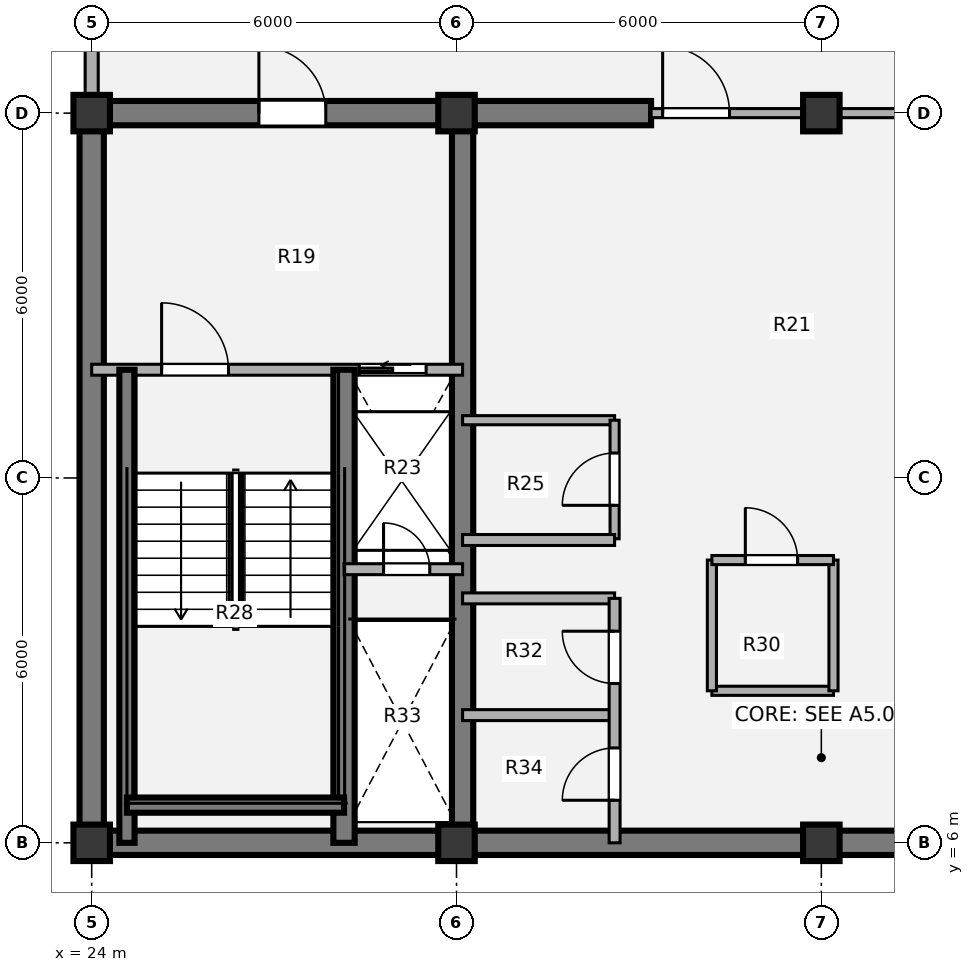
"""IFC4 building model, lengths in metres.
Left out: names, types, materials, properties, quantities, classifications, styles, units other than length and angle.
Written with IfcOpenShell. Run it as: python <this file> out.ifc"""

import sys

from ifc_helpers import new_model, si_unit, direction, frame, frame_2d, origin, origin_2d, place, context, subcontext, project, spatial, rectangle, extrude, source, transform, mapped, element, fill, save


model = new_model("IFC4")
c1 = context("Model", 3, precision=1e-05, world=origin(), true_north=direction((0.0, 1.0)))
c2 = subcontext(c1, "Body", "Model", "MODEL_VIEW")
j1 = project(units=[si_unit("LENGTHUNIT", "METRE"), si_unit("PLANEANGLEUNIT", "RADIAN")], contexts=[c1])
p1 = place(None, origin())
s1 = spatial("IfcSite", under=j1, at=p1, CompositionType="ELEMENT")
p2 = place(p1, origin())
s2 = spatial("IfcBuilding", under=s1, at=p2, CompositionType="ELEMENT")
p3 = place(p2, frame((0.0, 0.0, 241.92)))
s3 = spatial("IfcBuildingStorey", under=s2, at=p3, CompositionType="ELEMENT", Elevation=241.92)
m1 = source(origin(), c2, "Body", "SweptSolid", [
    extrude(rectangle(XDim=0.6, YDim=0.6, at=origin_2d()), origin(), (0.0, 0.0, 1.0), 3.78),
])
for number, where, z_axis, x_axis in (
    (1, (24.0, 6.0, 0.0), (0.0, 0.0, 1.0), (1.0, 0.0, 0.0)),
    (2, (30.0, 6.0, 0.0), (0.0, 0.0, 1.0), (1.0, 0.0, 0.0)),
    (3, (36.0, 6.0, 0.0), (0.0, 0.0, 1.0), (1.0, 0.0, 0.0)),
    (4, (24.0, 18.0, 0.0), (0.0, 0.0, 1.0), (1.0, 0.0, 0.0)),
    (5, (30.0, 18.0, 0.0), (0.0, 0.0, 1.0), (1.0, 0.0, 0.0)),
    (6, (36.0, 18.0, 0.0), (0.0, 0.0, 1.0), (1.0, 0.0, 0.0)),
):
    element("IfcColumn", number, at=place(p3, frame(where, z_axis=z_axis, x_axis=x_axis)), inside=s3, PredefinedType="COLUMN", context=c2, shape_type="MappedRepresentation", body=[
        mapped(m1, transform((0.0, 0.0, 0.0), x_axis=(1.0, 0.0, 0.0), y_axis=(0.0, 1.0, 0.0), z_axis=(0.0, 0.0, 1.0), scale=1.0)),
    ])
p4 = place(p3, frame((48.2, 6.0, 0.0), z_axis=(0.0, 0.0, 1.0), x_axis=(-1.0, 0.0, 0.0)))
e7 = element("IfcWall", 7, at=p4, inside=s3, PredefinedType="SHEAR", context=c2, shape_type="SweptSolid", body=[
    extrude(rectangle(XDim=24.4, YDim=0.4, at=frame_2d((12.2, 0.0))), origin(), (0.0, 0.0, 1.0), 3.78),
])
p5 = place(p3, frame((24.0, 6.0, 0.0), z_axis=(0.0, 0.0, 1.0), x_axis=(0.0, 1.0, 0.0)))
e8 = element("IfcWall", 8, at=p5, inside=s3, PredefinedType="SHEAR", context=c2, shape_type="SweptSolid", body=[
    extrude(rectangle(XDim=12.0, YDim=0.4, at=frame_2d((6.0, 0.0))), origin(), (0.0, 0.0, 1.0), 3.78),
])
p6 = place(p3, frame((23.8, 18.0, 0.0), z_axis=(0.0, 0.0, 1.0), x_axis=(1.0, 0.0, 0.0)))
e9 = element("IfcWall", 9, at=p6, inside=s3, PredefinedType="SHEAR", context=c2, shape_type="SweptSolid", body=[
    extrude(rectangle(XDim=9.4, YDim=0.4, at=frame_2d((4.7, 0.0))), origin(), (0.0, 0.0, 1.0), 3.78),
])
p7 = place(p6, frame((2.95, 0.0, 0.0)))
e10 = element("IfcOpeningElement", 10, at=p7, cuts=e9, PredefinedType="OPENING", context=c2, shape_type="SweptSolid", body=[
    extrude(rectangle(XDim=1.1, YDim=2.1, at=origin_2d()), frame((0.55, 0.21, 1.05), z_axis=(0.0, -1.0, 0.0), x_axis=(1.0, 0.0, 0.0)), (0.0, 0.0, 1.0), 0.42),
])
p8 = place(p3, frame((30.1, 6.0, 0.0), z_axis=(0.0, 0.0, 1.0), x_axis=(0.0, 1.0, 0.0)))
e11 = element("IfcWall", 11, at=p8, inside=s3, PredefinedType="SHEAR", context=c2, shape_type="SweptSolid", body=[
    extrude(rectangle(XDim=12.0, YDim=0.35, at=frame_2d((6.0, 0.0))), origin(), (0.0, 0.0, 1.0), 3.78),
])
p9 = place(p3, frame((24.0, 18.28, 0.0), z_axis=(0.0, 0.0, 1.0), x_axis=(0.0, 1.0, 0.0)))
e12 = element("IfcWall", 12, at=p9, inside=s3, PredefinedType="SOLIDWALL", context=c2, shape_type="SweptSolid", body=[
    extrude(rectangle(XDim=2.77, YDim=0.215, at=frame_2d((1.385, 0.0))), origin(), (0.0, 0.0, 1.0), 2.718),
])
p10 = place(p3, frame((30.1, 12.95, 0.0), z_axis=(0.0, 0.0, 1.0), x_axis=(1.0, 0.0, 0.0)))
e13 = element("IfcWall", 13, at=p10, inside=s3, PredefinedType="PARTITIONING", context=c2, shape_type="SweptSolid", body=[
    extrude(rectangle(XDim=2.5, YDim=0.15, at=frame_2d((1.25, 0.0))), origin(), (0.0, 0.0, 1.0), 3.5),
])
p11 = place(p3, frame((32.6, 11.0, 0.0), z_axis=(0.0, 0.0, 1.0), x_axis=(0.0, 1.0, 0.0)))
e14 = element("IfcWall", 14, at=p11, inside=s3, PredefinedType="PARTITIONING", context=c2, shape_type="SweptSolid", body=[
    extrude(rectangle(XDim=1.95, YDim=0.15, at=frame_2d((0.975, 0.0))), origin(), (0.0, 0.0, 1.0), 3.5),
])
p12 = place(p11, frame((0.55, 0.0, 0.0)))
e15 = element("IfcOpeningElement", 15, at=p12, cuts=e14, PredefinedType="OPENING", context=c2, shape_type="SweptSolid", body=[
    extrude(rectangle(XDim=0.86, YDim=2.1, at=origin_2d()), frame((0.43, 0.085, 1.05), z_axis=(0.0, -1.0, 0.0), x_axis=(1.0, 0.0, 0.0)), (0.0, 0.0, 1.0), 0.17),
])
p13 = place(p3, frame((34.2, 8.5, 0.0), z_axis=(0.0, 0.0, 1.0), x_axis=(1.0, 0.0, 0.0)))
e16 = element("IfcWall", 16, at=p13, inside=s3, PredefinedType="PARTITIONING", context=c2, shape_type="SweptSolid", body=[
    extrude(rectangle(XDim=2.0, YDim=0.15, at=frame_2d((1.0, 0.0))), origin(), (0.0, 0.0, 1.0), 3.5),
])
p14 = place(p3, frame((34.2, 8.5, 0.0), z_axis=(0.0, 0.0, 1.0), x_axis=(0.0, 1.0, 0.0)))
e17 = element("IfcWall", 17, at=p14, inside=s3, PredefinedType="PARTITIONING", context=c2, shape_type="SweptSolid", body=[
    extrude(rectangle(XDim=2.15, YDim=0.15, at=frame_2d((1.075, 0.0))), origin(), (0.0, 0.0, 1.0), 3.5),
])
p15 = place(p3, frame((36.2, 8.5, 0.0), z_axis=(0.0, 0.0, 1.0), x_axis=(0.0, 1.0, 0.0)))
e18 = element("IfcWall", 18, at=p15, inside=s3, PredefinedType="PARTITIONING", context=c2, shape_type="SweptSolid", body=[
    extrude(rectangle(XDim=2.15, YDim=0.15, at=frame_2d((1.075, 0.0))), origin(), (0.0, 0.0, 1.0), 2.715),
])
p16 = place(p3, frame((34.2, 10.65, 0.0), z_axis=(0.0, 0.0, 1.0), x_axis=(1.0, 0.0, 0.0)))
e19 = element("IfcWall", 19, at=p16, inside=s3, PredefinedType="PARTITIONING", context=c2, shape_type="SweptSolid", body=[
    extrude(rectangle(XDim=2.0, YDim=0.15, at=frame_2d((1.0, 0.0))), origin(), (0.0, 0.0, 1.0), 3.5),
])
p17 = place(p16, frame((0.55, 0.0, 0.0)))
e20 = element("IfcOpeningElement", 20, at=p17, cuts=e19, PredefinedType="OPENING", context=c2, shape_type="SweptSolid", body=[
    extrude(rectangle(XDim=0.86, YDim=2.1, at=origin_2d()), frame((0.43, 0.085, 1.05), z_axis=(0.0, -1.0, 0.0), x_axis=(1.0, 0.0, 0.0)), (0.0, 0.0, 1.0), 0.17),
])
for number, where, z_axis, x_axis in (
    (21, (30.1, 10.98, 0.0), (0.0, 0.0, 1.0), (1.0, 0.0, 0.0)),
    (22, (30.1, 8.1, 0.0), (0.0, 0.0, 1.0), (1.0, 0.0, 0.0)),
    (23, (30.1, 10.02, 0.0), (0.0, 0.0, 1.0), (1.0, 0.0, 0.0)),
):
    element("IfcWall", number, at=place(p3, frame(where, z_axis=z_axis, x_axis=x_axis)), inside=s3, PredefinedType="PARTITIONING", context=c2, shape_type="SweptSolid", body=[
        extrude(rectangle(XDim=2.5, YDim=0.18, at=frame_2d((1.25, 0.0))), origin(), (0.0, 0.0, 1.0), 3.5),
    ])
p18 = place(p3, frame((32.6, 6.0, 0.0), z_axis=(0.0, 0.0, 1.0), x_axis=(0.0, 1.0, 0.0)))
e24 = element("IfcWall", 24, at=p18, inside=s3, PredefinedType="PARTITIONING", context=c2, shape_type="SweptSolid", body=[
    extrude(rectangle(XDim=4.02, YDim=0.18, at=frame_2d((2.01, 0.0))), origin(), (0.0, 0.0, 1.0), 3.5),
])
p19 = place(p18, frame((0.7, 0.0, 0.0)))
e25 = element("IfcOpeningElement", 25, at=p19, cuts=e24, PredefinedType="OPENING", context=c2, shape_type="SweptSolid", body=[
    extrude(rectangle(XDim=0.86, YDim=2.1, at=origin_2d()), frame((0.43, 0.1, 1.05), z_axis=(0.0, -1.0, 0.0), x_axis=(1.0, 0.0, 0.0)), (0.0, 0.0, 1.0), 0.2),
])
p20 = place(p18, frame((2.62, 0.0, 0.0)))
e26 = element("IfcOpeningElement", 26, at=p20, cuts=e24, PredefinedType="OPENING", context=c2, shape_type="SweptSolid", body=[
    extrude(rectangle(XDim=0.86, YDim=2.1, at=origin_2d()), frame((0.43, 0.1, 1.05), z_axis=(0.0, -1.0, 0.0), x_axis=(1.0, 0.0, 0.0)), (0.0, 0.0, 1.0), 0.2),
])
p21 = place(p3, frame((33.2, 18.0, 0.0), z_axis=(0.0, 0.0, 1.0), x_axis=(1.0, 0.0, 0.0)))
e27 = element("IfcWall", 27, at=p21, inside=s3, PredefinedType="PARTITIONING", context=c2, shape_type="SweptSolid", body=[
    extrude(rectangle(XDim=5.6, YDim=0.15, at=frame_2d((2.8, 0.0))), origin(), (0.0, 0.0, 1.0), 2.515),
])
p22 = place(p21, frame((0.19, 0.0, 0.0)))
e28 = element("IfcOpeningElement", 28, at=p22, cuts=e27, PredefinedType="OPENING", context=c2, shape_type="SweptSolid", body=[
    extrude(rectangle(XDim=1.1, YDim=2.1, at=origin_2d()), frame((0.55, 0.085, 1.05), z_axis=(0.0, -1.0, 0.0), x_axis=(1.0, 0.0, 0.0)), (0.0, 0.0, 1.0), 0.17),
])
p23 = place(p21, frame((4.31, 0.0, 0.0)))
e29 = element("IfcOpeningElement", 29, at=p23, cuts=e27, PredefinedType="OPENING", context=c2, shape_type="SweptSolid", body=[
    extrude(rectangle(XDim=1.1, YDim=2.1, at=origin_2d()), frame((0.55, 0.085, 1.05), z_axis=(0.0, -1.0, 0.0), x_axis=(1.0, 0.0, 0.0)), (0.0, 0.0, 1.0), 0.17),
])
p24 = place(p3, frame((24.0, 13.78, 0.0), z_axis=(0.0, 0.0, 1.0), x_axis=(1.0, 0.0, 0.0)))
e30 = element("IfcWall", 30, at=p24, inside=s3, PredefinedType="PARTITIONING", context=c2, shape_type="SweptSolid", body=[
    extrude(rectangle(XDim=6.1, YDim=0.18, at=frame_2d((3.05, 0.0))), origin(), (0.0, 0.0, 1.0), 3.5),
])
p25 = place(p24, frame((1.15, 0.0, 0.0)))
e31 = element("IfcOpeningElement", 31, at=p25, cuts=e30, PredefinedType="OPENING", context=c2, shape_type="SweptSolid", body=[
    extrude(rectangle(XDim=1.1, YDim=2.1, at=origin_2d()), frame((0.55, 0.1, 1.05), z_axis=(0.0, -1.0, 0.0), x_axis=(1.0, 0.0, 0.0)), (0.0, 0.0, 1.0), 0.2),
])
p26 = place(p24, frame((4.4, 0.0, 0.0)))
e32 = element("IfcOpeningElement", 32, at=p26, cuts=e30, PredefinedType="OPENING", context=c2, shape_type="SweptSolid", body=[
    extrude(rectangle(XDim=1.1, YDim=2.1, at=origin_2d()), frame((0.55, 0.1, 1.05), z_axis=(0.0, -1.0, 0.0), x_axis=(1.0, 0.0, 0.0)), (0.0, 0.0, 1.0), 0.2),
])
p27 = place(p3, frame((28.15, 6.0, 0.0), z_axis=(0.0, 0.0, 1.0), x_axis=(0.0, 1.0, 0.0)))
e33 = element("IfcWall", 33, at=p27, inside=s3, PredefinedType="SHEAR", context=c2, shape_type="SweptSolid", body=[
    extrude(rectangle(XDim=7.78, YDim=0.35, at=frame_2d((3.89, 0.0))), origin(), (0.0, 0.0, 1.0), 3.85),
])
p28 = place(p3, frame((24.58, 6.0, 0.0), z_axis=(0.0, 0.0, 1.0), x_axis=(0.0, 1.0, 0.0)))
e34 = element("IfcWall", 34, at=p28, inside=s3, PredefinedType="SHEAR", context=c2, shape_type="SweptSolid", body=[
    extrude(rectangle(XDim=7.78, YDim=0.25, at=frame_2d((3.89, 0.0))), origin(), (0.0, 0.0, 1.0), 3.85),
])
p29 = place(p3, frame((24.58, 6.62, 0.0), z_axis=(0.0, 0.0, 1.0), x_axis=(1.0, 0.0, 0.0)))
e35 = element("IfcWall", 35, at=p29, inside=s3, PredefinedType="SHEAR", context=c2, shape_type="SweptSolid", body=[
    extrude(rectangle(XDim=3.57, YDim=0.25, at=frame_2d((1.785, 0.0))), origin(), (0.0, 0.0, 1.0), 3.85),
])
p30 = place(p3, frame((28.15, 10.5, 0.0), z_axis=(0.0, 0.0, 1.0), x_axis=(1.0, 0.0, 0.0)))
e36 = element("IfcWall", 36, at=p30, inside=s3, PredefinedType="PARTITIONING", context=c2, shape_type="SweptSolid", body=[
    extrude(rectangle(XDim=1.95, YDim=0.18, at=frame_2d((0.975, 0.0))), origin(), (0.0, 0.0, 1.0), 3.5),
])
p31 = place(p30, frame((0.65, 0.0, 0.0)))
e37 = element("IfcOpeningElement", 37, at=p31, cuts=e36, PredefinedType="OPENING", context=c2, shape_type="SweptSolid", body=[
    extrude(rectangle(XDim=0.76, YDim=2.05, at=origin_2d()), frame((0.38, 0.1, 1.025), z_axis=(0.0, -1.0, 0.0), x_axis=(1.0, 0.0, 0.0)), (0.0, 0.0, 1.0), 0.2),
])
m2 = source(origin(), c2, "Body", "SweptSolid", [
    extrude(rectangle(XDim=0.86, YDim=2.1, at=origin_2d()), frame((0.43, 0.025, 1.05), z_axis=(0.0, -1.0, 0.0), x_axis=(1.0, 0.0, 0.0)), (0.0, 0.0, 1.0), 0.05),
])
p32 = place(p12, origin())
e38 = element("IfcDoor", 38, at=p32, inside=s3, OperationType="SINGLE_SWING_LEFT", PredefinedType="DOOR", context=c2, shape_type="MappedRepresentation", body=[
    mapped(m2, transform((0.0, 0.0, 0.0), x_axis=(1.0, 0.0, 0.0), y_axis=(0.0, 1.0, 0.0), z_axis=(0.0, 0.0, 1.0), scale=1.0)),
])
fill(e15, e38)
p33 = place(p17, origin())
e39 = element("IfcDoor", 39, at=p33, inside=s3, OperationType="SINGLE_SWING_LEFT", PredefinedType="DOOR", context=c2, shape_type="MappedRepresentation", body=[
    mapped(m2, transform((0.0, 0.0, 0.0), x_axis=(1.0, 0.0, 0.0), y_axis=(0.0, 1.0, 0.0), z_axis=(0.0, 0.0, 1.0), scale=1.0)),
])
fill(e20, e39)
p34 = place(p19, origin())
e40 = element("IfcDoor", 40, at=p34, inside=s3, OperationType="SINGLE_SWING_LEFT", PredefinedType="DOOR", context=c2, shape_type="MappedRepresentation", body=[
    mapped(m2, transform((0.0, 0.0, 0.0), x_axis=(1.0, 0.0, 0.0), y_axis=(0.0, 1.0, 0.0), z_axis=(0.0, 0.0, 1.0), scale=1.0)),
])
fill(e25, e40)
p35 = place(p20, origin())
e41 = element("IfcDoor", 41, at=p35, inside=s3, OperationType="SINGLE_SWING_RIGHT", PredefinedType="DOOR", context=c2, shape_type="MappedRepresentation", body=[
    mapped(m2, transform((0.0, 0.0, 0.0), x_axis=(1.0, 0.0, 0.0), y_axis=(0.0, 1.0, 0.0), z_axis=(0.0, 0.0, 1.0), scale=1.0)),
])
fill(e26, e41)
m3 = source(origin(), c2, "Body", "SweptSolid", [
    extrude(rectangle(XDim=1.1, YDim=2.1, at=origin_2d()), frame((0.55, 0.025, 1.05), z_axis=(0.0, -1.0, 0.0), x_axis=(1.0, 0.0, 0.0)), (0.0, 0.0, 1.0), 0.05),
])
p36 = place(p22, origin())
e42 = element("IfcDoor", 42, at=p36, inside=s3, OperationType="SINGLE_SWING_LEFT", PredefinedType="DOOR", context=c2, shape_type="MappedRepresentation", body=[
    mapped(m3, transform((0.0, 0.0, 0.0), x_axis=(1.0, 0.0, 0.0), y_axis=(0.0, 1.0, 0.0), z_axis=(0.0, 0.0, 1.0), scale=1.0)),
])
fill(e28, e42)
m4 = source(origin(), c2, "Body", "SweptSolid", [
    extrude(rectangle(XDim=1.1, YDim=2.1, at=origin_2d()), frame((0.55, 0.025, 1.05), z_axis=(0.0, -1.0, 0.0), x_axis=(1.0, 0.0, 0.0)), (0.0, 0.0, 1.0), 0.05),
])
p37 = place(p25, origin())
e43 = element("IfcDoor", 43, at=p37, inside=s3, OperationType="SINGLE_SWING_LEFT", PredefinedType="DOOR", context=c2, shape_type="MappedRepresentation", body=[
    mapped(m4, transform((0.0, 0.0, 0.0), x_axis=(1.0, 0.0, 0.0), y_axis=(0.0, 1.0, 0.0), z_axis=(0.0, 0.0, 1.0), scale=1.0)),
])
fill(e31, e43)
m5 = source(origin(), c2, "Body", "SweptSolid", [
    extrude(rectangle(XDim=1.1, YDim=2.1, at=origin_2d()), frame((0.55, 0.025, 1.05), z_axis=(0.0, -1.0, 0.0), x_axis=(1.0, 0.0, 0.0)), (0.0, 0.0, 1.0), 0.05),
])
p38 = place(p26, origin())
e44 = element("IfcDoor", 44, at=p38, inside=s3, OperationType="SLIDING_TO_LEFT", PredefinedType="DOOR", context=c2, shape_type="MappedRepresentation", body=[
    mapped(m5, transform((0.0, 0.0, 0.0), x_axis=(1.0, 0.0, 0.0), y_axis=(0.0, 1.0, 0.0), z_axis=(0.0, 0.0, 1.0), scale=1.0)),
])
fill(e32, e44)
m6 = source(origin(), c2, "Body", "SweptSolid", [
    extrude(rectangle(XDim=0.76, YDim=2.05, at=origin_2d()), frame((0.38, 0.025, 1.025), z_axis=(0.0, -1.0, 0.0), x_axis=(1.0, 0.0, 0.0)), (0.0, 0.0, 1.0), 0.05),
])
p39 = place(p31, origin())
e45 = element("IfcDoor", 45, at=p39, inside=s3, OperationType="SINGLE_SWING_LEFT", PredefinedType="DOOR", context=c2, shape_type="MappedRepresentation", body=[
    mapped(m6, transform((0.0, 0.0, 0.0), x_axis=(1.0, 0.0, 0.0), y_axis=(0.0, 1.0, 0.0), z_axis=(0.0, 0.0, 1.0), scale=1.0)),
])
fill(e37, e45)
p40 = place(p7, origin())
e46 = element("IfcDoor", 46, at=p40, inside=s3, OperationType="SINGLE_SWING_LEFT", PredefinedType="DOOR", context=c2, shape_type="MappedRepresentation", body=[
    mapped(m3, transform((0.0, 0.0, 0.0), x_axis=(1.0, 0.0, 0.0), y_axis=(0.0, 1.0, 0.0), z_axis=(0.0, 0.0, 1.0), scale=1.0)),
])
fill(e10, e46)
save(model, sys.argv[1])
